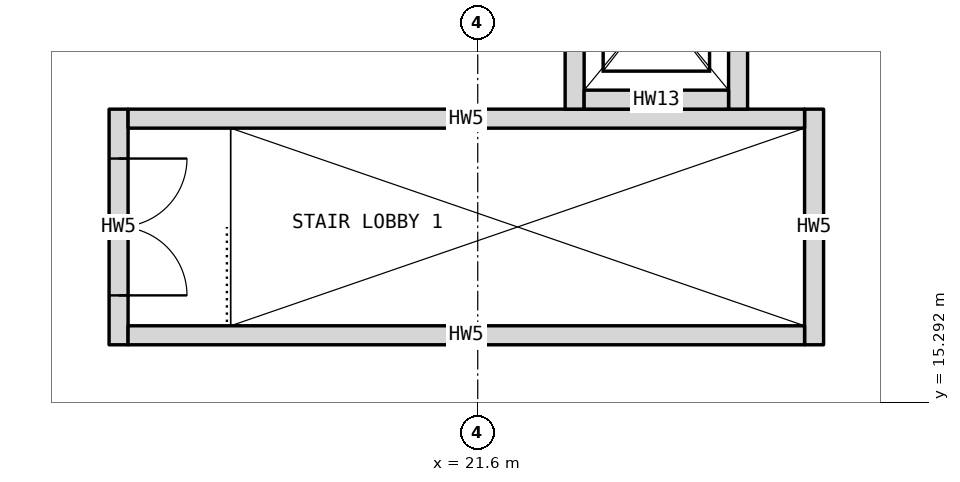
"""IFC4 building model, lengths in metres.
Left out: names, types, materials, properties, quantities, classifications, styles, units other than length and angle.
Written with IfcOpenShell. Run it as: python <this file> out.ifc"""

import sys

from ifc_helpers import new_model, si_unit, direction, frame, frame_2d, origin, place, context, subcontext, project, spatial, rectangle, extrude, element, fill, save


model = new_model("IFC4")
c1 = context("Model", 3, precision=1e-05, world=origin(), true_north=direction((0.0, 1.0)))
c2 = subcontext(c1, "Body", "Model", "MODEL_VIEW")
j1 = project(units=[si_unit("LENGTHUNIT", "METRE"), si_unit("PLANEANGLEUNIT", "RADIAN")], contexts=[c1])
p1 = place(None, origin())
s1 = spatial("IfcSite", under=j1, at=p1, CompositionType="ELEMENT")
p2 = place(p1, origin())
s2 = spatial("IfcBuilding", under=s1, at=p2, CompositionType="ELEMENT")
p3 = place(p2, origin())
s3 = spatial("IfcBuildingStorey", under=s2, at=p3, CompositionType="ELEMENT", Elevation=0.0)
p4 = place(p3, frame((16.875, 16.05, 0.0), z_axis=(0.0, 0.0, 1.0), x_axis=(0.0, 1.0, 0.0)))
e1 = element("IfcWall", 1, at=p4, inside=s3, PredefinedType="SOLIDWALL", context=c2, shape_type="SweptSolid", body=[
    extrude(rectangle(XDim=3.1, YDim=0.25, at=frame_2d((1.55, 0.0))), origin(), (0.0, 0.0, 1.0), 3.2),
])
p5 = place(p4, frame((0.65, 0.0, 0.0)))
e2 = element("IfcOpeningElement", 2, at=p5, cuts=e1, PredefinedType="OPENING", context=c2, shape_type="SweptSolid", body=[
    extrude(rectangle(XDim=1.8, YDim=2.1, at=frame_2d((0.9, 1.05))), frame((0.0, 0.135, 0.0), z_axis=(0.0, -1.0, 0.0), x_axis=(1.0, 0.0, 0.0)), (0.0, 0.0, 1.0), 0.27),
])
p6 = place(p3, frame((26.025, 16.05, 0.0), z_axis=(0.0, 0.0, 1.0), x_axis=(0.0, 1.0, 0.0)))
e3 = element("IfcWall", 3, at=p6, inside=s3, PredefinedType="SOLIDWALL", context=c2, shape_type="SweptSolid", body=[
    extrude(rectangle(XDim=3.1, YDim=0.25, at=frame_2d((1.55, 0.0))), origin(), (0.0, 0.0, 1.0), 3.2),
])
for number, where, z_axis, x_axis in (
    (4, (17.0, 16.175, 0.0), (0.0, 0.0, 1.0), (1.0, 0.0, 0.0)),
    (5, (17.0, 19.025, 0.0), (0.0, 0.0, 1.0), (1.0, 0.0, 0.0)),
):
    element("IfcWall", number, at=place(p3, frame(where, z_axis=z_axis, x_axis=x_axis)), inside=s3, PredefinedType="SOLIDWALL", context=c2, shape_type="SweptSolid", body=[
        extrude(rectangle(XDim=8.9, YDim=0.25, at=frame_2d((4.45, 0.0))), origin(), (0.0, 0.0, 1.0), 3.2),
    ])
for number, where, z_axis, x_axis in (
    (6, (22.875, 19.15, 0.0), (0.0, 0.0, 1.0), (0.0, 1.0, 0.0)),
    (7, (25.025, 19.15, 0.0), (0.0, 0.0, 1.0), (0.0, 1.0, 0.0)),
):
    element("IfcWall", number, at=place(p3, frame(where, z_axis=z_axis, x_axis=x_axis)), inside=s3, PredefinedType="SOLIDWALL", context=c2, shape_type="SweptSolid", body=[
        extrude(rectangle(XDim=2.8, YDim=0.25, at=frame_2d((1.4, 0.0))), origin(), (0.0, 0.0, 1.0), 4.2),
    ])
p7 = place(p3, frame((23.0, 19.275, 0.0), z_axis=(0.0, 0.0, 1.0), x_axis=(1.0, 0.0, 0.0)))
e8 = element("IfcWall", 8, at=p7, inside=s3, PredefinedType="SOLIDWALL", context=c2, shape_type="SweptSolid", body=[
    extrude(rectangle(XDim=1.9, YDim=0.25, at=frame_2d((0.95, 0.0))), origin(), (0.0, 0.0, 1.0), 4.2),
])
p8 = place(p5, frame((1.8, 0.0, 0.0), z_axis=(0.0, 0.0, 1.0), x_axis=(-1.0, 0.0, 0.0)))
e9 = element("IfcDoor", 9, at=p8, inside=s3, OperationType="DOUBLE_DOOR_SINGLE_SWING", PredefinedType="DOOR", context=c2, shape_type="SweptSolid", body=[
    extrude(rectangle(XDim=1.8, YDim=2.1, at=frame_2d((0.9, 1.05))), frame((0.0, 0.025, 0.0), z_axis=(0.0, -1.0, 0.0), x_axis=(1.0, 0.0, 0.0)), (0.0, 0.0, 1.0), 0.05),
])
fill(e2, e9)
save(model, sys.argv[1])
